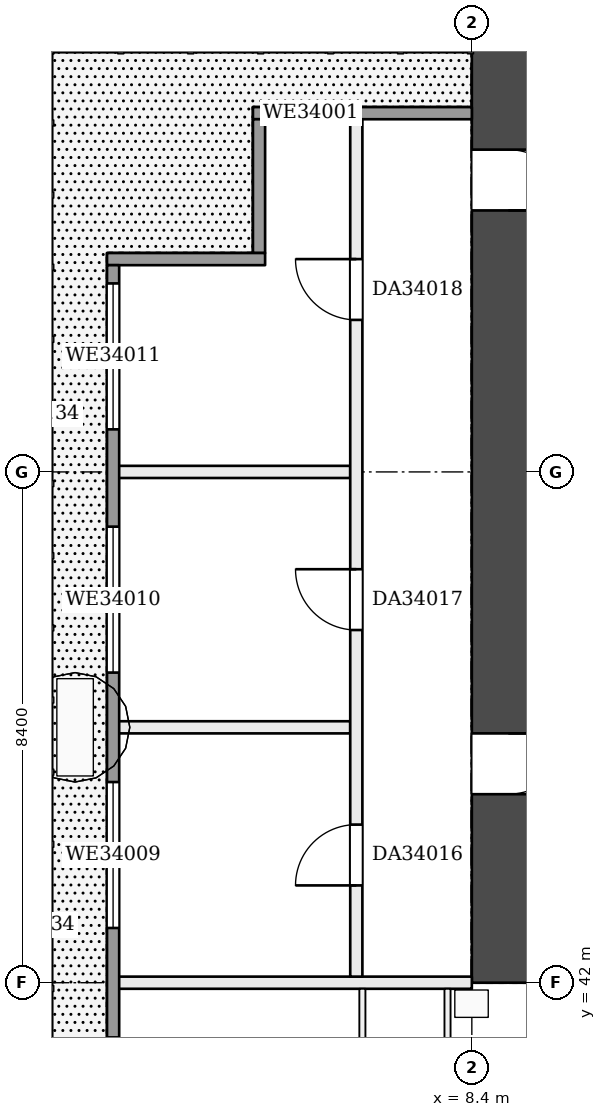
"""IFC4 building model, lengths in metres.
Left out: names, types, materials, properties, quantities, classifications, styles, units other than length and angle.
Written with IfcOpenShell. Run it as: python <this file> out.ifc"""

import sys

from ifc_helpers import new_model, si_unit, direction, frame, frame_2d, origin, place, context, subcontext, project, spatial, rectangle, extrude, element, fill, save


model = new_model("IFC4")
c1 = context("Model", 3, precision=1e-05, world=origin(), true_north=direction((0.0, 1.0)))
c2 = subcontext(c1, "Body", "Model", "MODEL_VIEW")
j1 = project(units=[si_unit("LENGTHUNIT", "METRE"), si_unit("PLANEANGLEUNIT", "RADIAN")], contexts=[c1])
p1 = place(None, origin())
s1 = spatial("IfcSite", under=j1, at=p1, CompositionType="ELEMENT")
p2 = place(p1, origin())
s2 = spatial("IfcBuilding", under=s1, at=p2, CompositionType="ELEMENT")
p3 = place(p2, frame((0.0, 0.0, 133.7)))
s3 = spatial("IfcBuildingStorey", under=s2, at=p3, CompositionType="ELEMENT", Elevation=133.7)
p4 = place(p3, frame((9.0, 58.8, 0.0), z_axis=(0.0, 0.0, 1.0), x_axis=(0.0, -1.0, 0.0)))
e1 = element("IfcWall", 1, at=p4, inside=s3, PredefinedType="SHEAR", context=c2, shape_type="SweptSolid", body=[
    extrude(rectangle(XDim=16.8, YDim=1.2, at=frame_2d((8.4, 0.0))), origin(), (0.0, 0.0, 1.0), 3.22),
])
p5 = place(p4, frame((3.1, 0.0, 0.0)))
e2 = element("IfcOpeningElement", 2, at=p5, cuts=e1, PredefinedType="OPENING", context=c2, shape_type="SweptSolid", body=[
    extrude(rectangle(XDim=1.0, YDim=2.1, at=frame_2d((0.5, 1.05))), frame((0.0, 0.61, 0.0), z_axis=(0.0, -1.0, 0.0), x_axis=(1.0, 0.0, 0.0)), (0.0, 0.0, 1.0), 1.22),
])
p6 = place(p4, frame((12.7, 0.0, 0.0)))
e3 = element("IfcOpeningElement", 3, at=p6, cuts=e1, PredefinedType="OPENING", context=c2, shape_type="SweptSolid", body=[
    extrude(rectangle(XDim=1.0, YDim=2.1, at=frame_2d((0.5, 1.05))), frame((0.0, 0.61, 0.0), z_axis=(0.0, -1.0, 0.0), x_axis=(1.0, 0.0, 0.0)), (0.0, 0.0, 1.0), 1.22),
])
p7 = place(p3, frame((2.5, 42.0, 0.0), z_axis=(0.0, 0.0, 1.0), x_axis=(1.0, 0.0, 0.0)))
e4 = element("IfcWall", 4, at=p7, inside=s3, PredefinedType="PARTITIONING", context=c2, shape_type="SweptSolid", body=[
    extrude(rectangle(XDim=5.9, YDim=0.2, at=frame_2d((2.95, 0.0))), origin(), (0.0, 0.0, 1.0), 3.22),
])
for number, where, z_axis, x_axis in (
    (5, (2.5, 46.2, 0.0), (0.0, 0.0, 1.0), (1.0, 0.0, 0.0)),
    (6, (2.5, 50.4, 0.0), (0.0, 0.0, 1.0), (1.0, 0.0, 0.0)),
):
    element("IfcWall", number, at=place(p3, frame(where, z_axis=z_axis, x_axis=x_axis)), inside=s3, PredefinedType="PARTITIONING", context=c2, shape_type="SweptSolid", body=[
        extrude(rectangle(XDim=3.9, YDim=0.2, at=frame_2d((1.95, 0.0))), origin(), (0.0, 0.0, 1.0), 3.22),
    ])
p8 = place(p3, frame((6.5, 42.1, 0.0), z_axis=(0.0, 0.0, 1.0), x_axis=(0.0, 1.0, 0.0)))
e7 = element("IfcWall", 7, at=p8, inside=s3, PredefinedType="PARTITIONING", context=c2, shape_type="SweptSolid", body=[
    extrude(rectangle(XDim=14.2, YDim=0.2, at=frame_2d((7.1, 0.0))), origin(), (0.0, 0.0, 1.0), 3.22),
])
p9 = place(p8, frame((1.5, 0.0, 0.0)))
e8 = element("IfcOpeningElement", 8, at=p9, cuts=e7, PredefinedType="OPENING", context=c2, shape_type="SweptSolid", body=[
    extrude(rectangle(XDim=1.0, YDim=2.1, at=frame_2d((0.5, 1.05))), frame((0.0, 0.11, 0.0), z_axis=(0.0, -1.0, 0.0), x_axis=(1.0, 0.0, 0.0)), (0.0, 0.0, 1.0), 0.22),
])
p10 = place(p8, frame((5.7, 0.0, 0.0)))
e9 = element("IfcOpeningElement", 9, at=p10, cuts=e7, PredefinedType="OPENING", context=c2, shape_type="SweptSolid", body=[
    extrude(rectangle(XDim=1.0, YDim=2.1, at=frame_2d((0.5, 1.05))), frame((0.0, 0.11, 0.0), z_axis=(0.0, -1.0, 0.0), x_axis=(1.0, 0.0, 0.0)), (0.0, 0.0, 1.0), 0.22),
])
p11 = place(p8, frame((10.8, 0.0, 0.0)))
e10 = element("IfcOpeningElement", 10, at=p11, cuts=e7, PredefinedType="OPENING", context=c2, shape_type="SweptSolid", body=[
    extrude(rectangle(XDim=1.0, YDim=2.1, at=frame_2d((0.5, 1.05))), frame((0.0, 0.11, 0.0), z_axis=(0.0, -1.0, 0.0), x_axis=(1.0, 0.0, 0.0)), (0.0, 0.0, 1.0), 0.22),
])
p12 = place(p3, frame((6.6, 21.0, 0.0), z_axis=(0.0, 0.0, 1.0), x_axis=(0.0, 1.0, 0.0)))
e11 = element("IfcWall", 11, at=p12, inside=s3, PredefinedType="PARTITIONING", context=c2, shape_type="SweptSolid", body=[
    extrude(rectangle(XDim=20.9, YDim=0.1, at=frame_2d((10.45, 0.0))), origin(), (0.0, 0.0, 1.0), 3.22),
])
p13 = place(p12, frame((5.8, 0.0, 0.0)))
e12 = element("IfcOpeningElement", 12, at=p13, cuts=e11, PredefinedType="OPENING", context=c2, shape_type="SweptSolid", body=[
    extrude(rectangle(XDim=0.9, YDim=2.1, at=frame_2d((0.45, 1.05))), frame((0.0, 0.06, 0.0), z_axis=(0.0, -1.0, 0.0), x_axis=(1.0, 0.0, 0.0)), (0.0, 0.0, 1.0), 0.12),
])
p14 = place(p12, frame((14.2, 0.0, 0.0)))
e13 = element("IfcOpeningElement", 13, at=p14, cuts=e11, PredefinedType="OPENING", context=c2, shape_type="SweptSolid", body=[
    extrude(rectangle(XDim=0.9, YDim=2.1, at=frame_2d((0.45, 1.05))), frame((0.0, 0.06, 0.0), z_axis=(0.0, -1.0, 0.0), x_axis=(1.0, 0.0, 0.0)), (0.0, 0.0, 1.0), 0.12),
])
p15 = place(p12, frame((18.4, 0.0, 0.0)))
e14 = element("IfcOpeningElement", 14, at=p15, cuts=e11, PredefinedType="OPENING", context=c2, shape_type="SweptSolid", body=[
    extrude(rectangle(XDim=0.9, YDim=2.1, at=frame_2d((0.45, 1.05))), frame((0.0, 0.06, 0.0), z_axis=(0.0, -1.0, 0.0), x_axis=(1.0, 0.0, 0.0)), (0.0, 0.0, 1.0), 0.12),
])
p16 = place(p3, frame((8.0, 21.0, 0.0), z_axis=(0.0, 0.0, 1.0), x_axis=(0.0, 1.0, 0.0)))
e15 = element("IfcWall", 15, at=p16, inside=s3, PredefinedType="PARTITIONING", context=c2, shape_type="SweptSolid", body=[
    extrude(rectangle(XDim=20.9, YDim=0.1, at=frame_2d((10.45, 0.0))), origin(), (0.0, 0.0, 1.0), 3.22),
])
p17 = place(p16, frame((1.1, 0.0, 0.0)))
e16 = element("IfcOpeningElement", 16, at=p17, cuts=e15, PredefinedType="OPENING", context=c2, shape_type="SweptSolid", body=[
    extrude(rectangle(XDim=0.9, YDim=2.1, at=frame_2d((0.45, 1.05))), frame((0.0, 0.06, 0.0), z_axis=(0.0, -1.0, 0.0), x_axis=(1.0, 0.0, 0.0)), (0.0, 0.0, 1.0), 0.12),
])
p18 = place(p16, frame((4.95, 0.0, 0.0)))
e17 = element("IfcOpeningElement", 17, at=p18, cuts=e15, PredefinedType="OPENING", context=c2, shape_type="SweptSolid", body=[
    extrude(rectangle(XDim=0.9, YDim=2.1, at=frame_2d((0.45, 1.05))), frame((0.0, 0.06, 0.0), z_axis=(0.0, -1.0, 0.0), x_axis=(1.0, 0.0, 0.0)), (0.0, 0.0, 1.0), 0.12),
])
p19 = place(p16, frame((8.7, 0.0, 0.0)))
e18 = element("IfcOpeningElement", 18, at=p19, cuts=e15, PredefinedType="OPENING", context=c2, shape_type="SweptSolid", body=[
    extrude(rectangle(XDim=0.9, YDim=2.1, at=frame_2d((0.45, 1.05))), frame((0.0, 0.06, 0.0), z_axis=(0.0, -1.0, 0.0), x_axis=(1.0, 0.0, 0.0)), (0.0, 0.0, 1.0), 0.12),
])
p20 = place(p16, frame((13.35, 0.0, 0.0)))
e19 = element("IfcOpeningElement", 19, at=p20, cuts=e15, PredefinedType="OPENING", context=c2, shape_type="SweptSolid", body=[
    extrude(rectangle(XDim=0.9, YDim=2.1, at=frame_2d((0.45, 1.05))), frame((0.0, 0.06, 0.0), z_axis=(0.0, -1.0, 0.0), x_axis=(1.0, 0.0, 0.0)), (0.0, 0.0, 1.0), 0.12),
])
p21 = place(p16, frame((15.5, 0.0, 0.0)))
e20 = element("IfcOpeningElement", 20, at=p21, cuts=e15, PredefinedType="OPENING", context=c2, shape_type="SweptSolid", body=[
    extrude(rectangle(XDim=0.9, YDim=2.1, at=frame_2d((0.45, 1.05))), frame((0.0, 0.06, 0.0), z_axis=(0.0, -1.0, 0.0), x_axis=(1.0, 0.0, 0.0)), (0.0, 0.0, 1.0), 0.12),
])
p22 = place(p16, frame((18.75, 0.0, 0.0)))
e21 = element("IfcOpeningElement", 21, at=p22, cuts=e15, PredefinedType="OPENING", context=c2, shape_type="SweptSolid", body=[
    extrude(rectangle(XDim=0.9, YDim=2.1, at=frame_2d((0.45, 1.05))), frame((0.0, 0.06, 0.0), z_axis=(0.0, -1.0, 0.0), x_axis=(1.0, 0.0, 0.0)), (0.0, 0.0, 1.0), 0.12),
])
p23 = place(p3, frame((8.4, 56.3, 0.0), z_axis=(0.0, 0.0, 1.0), x_axis=(-1.0, 0.0, 0.0)))
e22 = element("IfcWall", 22, at=p23, inside=s3, PredefinedType="SOLIDWALL", context=c2, shape_type="SweptSolid", body=[
    extrude(rectangle(XDim=3.6, YDim=0.2, at=frame_2d((1.8, 0.0))), origin(), (0.0, 0.0, 1.0), 3.22),
])
p24 = place(p23, frame((2.0, 0.0, 0.9)))
e23 = element("IfcOpeningElement", 23, at=p24, cuts=e22, PredefinedType="OPENING", context=c2, shape_type="SweptSolid", body=[
    extrude(rectangle(XDim=1.3, YDim=1.5, at=frame_2d((0.65, 0.75))), frame((0.0, 0.11, 0.0), z_axis=(0.0, -1.0, 0.0), x_axis=(1.0, 0.0, 0.0)), (0.0, 0.0, 1.0), 0.22),
])
p25 = place(p3, frame((4.9, 56.2, 0.0), z_axis=(0.0, 0.0, 1.0), x_axis=(0.0, -1.0, 0.0)))
e24 = element("IfcWall", 24, at=p25, inside=s3, PredefinedType="SOLIDWALL", context=c2, shape_type="SweptSolid", body=[
    extrude(rectangle(XDim=2.2, YDim=0.2, at=frame_2d((1.1, 0.0))), origin(), (0.0, 0.0, 1.0), 3.22),
])
p26 = place(p3, frame((5.0, 53.9, 0.0), z_axis=(0.0, 0.0, 1.0), x_axis=(-1.0, 0.0, 0.0)))
e25 = element("IfcWall", 25, at=p26, inside=s3, PredefinedType="SOLIDWALL", context=c2, shape_type="SweptSolid", body=[
    extrude(rectangle(XDim=2.6, YDim=0.2, at=frame_2d((1.3, 0.0))), origin(), (0.0, 0.0, 1.0), 3.22),
])
p27 = place(p3, frame((2.5, 53.8, 0.0), z_axis=(0.0, 0.0, 1.0), x_axis=(0.0, -1.0, 0.0)))
e26 = element("IfcWall", 26, at=p27, inside=s3, PredefinedType="SOLIDWALL", context=c2, shape_type="SweptSolid", body=[
    extrude(rectangle(XDim=40.4, YDim=0.2, at=frame_2d((20.2, 0.0))), origin(), (0.0, 0.0, 1.0), 3.22),
])
p28 = place(p27, frame((37.7, 0.0, 0.9)))
e27 = element("IfcOpeningElement", 27, at=p28, cuts=e26, PredefinedType="OPENING", context=c2, shape_type="SweptSolid", body=[
    extrude(rectangle(XDim=2.4, YDim=1.5, at=frame_2d((1.2, 0.75))), frame((0.0, 0.11, 0.0), z_axis=(0.0, -1.0, 0.0), x_axis=(1.0, 0.0, 0.0)), (0.0, 0.0, 1.0), 0.22),
])
p29 = place(p27, frame((33.7, 0.0, 0.9)))
e28 = element("IfcOpeningElement", 28, at=p29, cuts=e26, PredefinedType="OPENING", context=c2, shape_type="SweptSolid", body=[
    extrude(rectangle(XDim=2.4, YDim=1.5, at=frame_2d((1.2, 0.75))), frame((0.0, 0.11, 0.0), z_axis=(0.0, -1.0, 0.0), x_axis=(1.0, 0.0, 0.0)), (0.0, 0.0, 1.0), 0.22),
])
p30 = place(p27, frame((29.5, 0.0, 0.0)))
e29 = element("IfcOpeningElement", 29, at=p30, cuts=e26, PredefinedType="OPENING", context=c2, shape_type="SweptSolid", body=[
    extrude(rectangle(XDim=2.4, YDim=2.2, at=frame_2d((1.2, 1.1))), frame((0.0, 0.11, 0.0), z_axis=(0.0, -1.0, 0.0), x_axis=(1.0, 0.0, 0.0)), (0.0, 0.0, 1.0), 0.22),
])
p31 = place(p27, frame((25.3, 0.0, 0.0)))
e30 = element("IfcOpeningElement", 30, at=p31, cuts=e26, PredefinedType="OPENING", context=c2, shape_type="SweptSolid", body=[
    extrude(rectangle(XDim=2.4, YDim=2.2, at=frame_2d((1.2, 1.1))), frame((0.0, 0.11, 0.0), z_axis=(0.0, -1.0, 0.0), x_axis=(1.0, 0.0, 0.0)), (0.0, 0.0, 1.0), 0.22),
])
p32 = place(p27, frame((21.1, 0.0, 0.0)))
e31 = element("IfcOpeningElement", 31, at=p32, cuts=e26, PredefinedType="OPENING", context=c2, shape_type="SweptSolid", body=[
    extrude(rectangle(XDim=2.4, YDim=2.2, at=frame_2d((1.2, 1.1))), frame((0.0, 0.11, 0.0), z_axis=(0.0, -1.0, 0.0), x_axis=(1.0, 0.0, 0.0)), (0.0, 0.0, 1.0), 0.22),
])
p33 = place(p27, frame((16.9, 0.0, 0.9)))
e32 = element("IfcOpeningElement", 32, at=p33, cuts=e26, PredefinedType="OPENING", context=c2, shape_type="SweptSolid", body=[
    extrude(rectangle(XDim=2.4, YDim=1.5, at=frame_2d((1.2, 0.75))), frame((0.0, 0.11, 0.0), z_axis=(0.0, -1.0, 0.0), x_axis=(1.0, 0.0, 0.0)), (0.0, 0.0, 1.0), 0.22),
])
p34 = place(p27, frame((12.7, 0.0, 0.9)))
e33 = element("IfcOpeningElement", 33, at=p34, cuts=e26, PredefinedType="OPENING", context=c2, shape_type="SweptSolid", body=[
    extrude(rectangle(XDim=2.4, YDim=1.5, at=frame_2d((1.2, 0.75))), frame((0.0, 0.11, 0.0), z_axis=(0.0, -1.0, 0.0), x_axis=(1.0, 0.0, 0.0)), (0.0, 0.0, 1.0), 0.22),
])
p35 = place(p27, frame((8.5, 0.0, 0.9)))
e34 = element("IfcOpeningElement", 34, at=p35, cuts=e26, PredefinedType="OPENING", context=c2, shape_type="SweptSolid", body=[
    extrude(rectangle(XDim=2.4, YDim=1.5, at=frame_2d((1.2, 0.75))), frame((0.0, 0.11, 0.0), z_axis=(0.0, -1.0, 0.0), x_axis=(1.0, 0.0, 0.0)), (0.0, 0.0, 1.0), 0.22),
])
p36 = place(p27, frame((4.3, 0.0, 0.9)))
e35 = element("IfcOpeningElement", 35, at=p36, cuts=e26, PredefinedType="OPENING", context=c2, shape_type="SweptSolid", body=[
    extrude(rectangle(XDim=2.4, YDim=1.5, at=frame_2d((1.2, 0.75))), frame((0.0, 0.11, 0.0), z_axis=(0.0, -1.0, 0.0), x_axis=(1.0, 0.0, 0.0)), (0.0, 0.0, 1.0), 0.22),
])
p37 = place(p27, frame((0.3, 0.0, 0.9)))
e36 = element("IfcOpeningElement", 36, at=p37, cuts=e26, PredefinedType="OPENING", context=c2, shape_type="SweptSolid", body=[
    extrude(rectangle(XDim=2.4, YDim=1.5, at=frame_2d((1.2, 0.75))), frame((0.0, 0.11, 0.0), z_axis=(0.0, -1.0, 0.0), x_axis=(1.0, 0.0, 0.0)), (0.0, 0.0, 1.0), 0.22),
])
p38 = place(p5, origin())
e37 = element("IfcDoor", 37, at=p38, inside=s3, OperationType="SINGLE_SWING_RIGHT", PredefinedType="DOOR", context=c2, shape_type="SweptSolid", body=[
    extrude(rectangle(XDim=1.0, YDim=2.1, at=frame_2d((0.5, 1.05))), frame((0.0, 0.025, 0.0), z_axis=(0.0, -1.0, 0.0), x_axis=(1.0, 0.0, 0.0)), (0.0, 0.0, 1.0), 0.05),
])
fill(e2, e37)
p39 = place(p6, origin())
e38 = element("IfcDoor", 38, at=p39, inside=s3, OperationType="SINGLE_SWING_LEFT", PredefinedType="DOOR", context=c2, shape_type="SweptSolid", body=[
    extrude(rectangle(XDim=1.0, YDim=2.1, at=frame_2d((0.5, 1.05))), frame((0.0, 0.025, 0.0), z_axis=(0.0, -1.0, 0.0), x_axis=(1.0, 0.0, 0.0)), (0.0, 0.0, 1.0), 0.05),
])
fill(e3, e38)
p40 = place(p9, origin())
e39 = element("IfcDoor", 39, at=p40, inside=s3, OperationType="SINGLE_SWING_LEFT", PredefinedType="DOOR", context=c2, shape_type="SweptSolid", body=[
    extrude(rectangle(XDim=1.0, YDim=2.1, at=frame_2d((0.5, 1.05))), frame((0.0, 0.025, 0.0), z_axis=(0.0, -1.0, 0.0), x_axis=(1.0, 0.0, 0.0)), (0.0, 0.0, 1.0), 0.05),
])
fill(e8, e39)
p41 = place(p10, origin())
e40 = element("IfcDoor", 40, at=p41, inside=s3, OperationType="SINGLE_SWING_RIGHT", PredefinedType="DOOR", context=c2, shape_type="SweptSolid", body=[
    extrude(rectangle(XDim=1.0, YDim=2.1, at=frame_2d((0.5, 1.05))), frame((0.0, 0.025, 0.0), z_axis=(0.0, -1.0, 0.0), x_axis=(1.0, 0.0, 0.0)), (0.0, 0.0, 1.0), 0.05),
])
fill(e9, e40)
p42 = place(p11, origin())
e41 = element("IfcDoor", 41, at=p42, inside=s3, OperationType="SINGLE_SWING_RIGHT", PredefinedType="DOOR", context=c2, shape_type="SweptSolid", body=[
    extrude(rectangle(XDim=1.0, YDim=2.1, at=frame_2d((0.5, 1.05))), frame((0.0, 0.025, 0.0), z_axis=(0.0, -1.0, 0.0), x_axis=(1.0, 0.0, 0.0)), (0.0, 0.0, 1.0), 0.05),
])
fill(e10, e41)
p43 = place(p24, origin())
e42 = element("IfcWindow", 42, at=p43, inside=s3, PartitioningType="SINGLE_PANEL", PredefinedType="WINDOW", context=c2, shape_type="SweptSolid", body=[
    extrude(rectangle(XDim=1.3, YDim=1.5, at=frame_2d((0.65, 0.75))), frame((0.0, 0.03, 0.0), z_axis=(0.0, -1.0, 0.0), x_axis=(1.0, 0.0, 0.0)), (0.0, 0.0, 1.0), 0.06),
])
fill(e23, e42)
p44 = place(p35, origin())
e43 = element("IfcWindow", 43, at=p44, inside=s3, PartitioningType="SINGLE_PANEL", PredefinedType="WINDOW", context=c2, shape_type="SweptSolid", body=[
    extrude(rectangle(XDim=2.4, YDim=1.5, at=frame_2d((1.2, 0.75))), frame((0.0, 0.03, 0.0), z_axis=(0.0, -1.0, 0.0), x_axis=(1.0, 0.0, 0.0)), (0.0, 0.0, 1.0), 0.06),
])
fill(e34, e43)
p45 = place(p36, origin())
e44 = element("IfcWindow", 44, at=p45, inside=s3, PartitioningType="SINGLE_PANEL", PredefinedType="WINDOW", context=c2, shape_type="SweptSolid", body=[
    extrude(rectangle(XDim=2.4, YDim=1.5, at=frame_2d((1.2, 0.75))), frame((0.0, 0.03, 0.0), z_axis=(0.0, -1.0, 0.0), x_axis=(1.0, 0.0, 0.0)), (0.0, 0.0, 1.0), 0.06),
])
fill(e35, e44)
p46 = place(p37, origin())
e45 = element("IfcWindow", 45, at=p46, inside=s3, PartitioningType="SINGLE_PANEL", PredefinedType="WINDOW", context=c2, shape_type="SweptSolid", body=[
    extrude(rectangle(XDim=2.4, YDim=1.5, at=frame_2d((1.2, 0.75))), frame((0.0, 0.03, 0.0), z_axis=(0.0, -1.0, 0.0), x_axis=(1.0, 0.0, 0.0)), (0.0, 0.0, 1.0), 0.06),
])
fill(e36, e45)
save(model, sys.argv[1])
